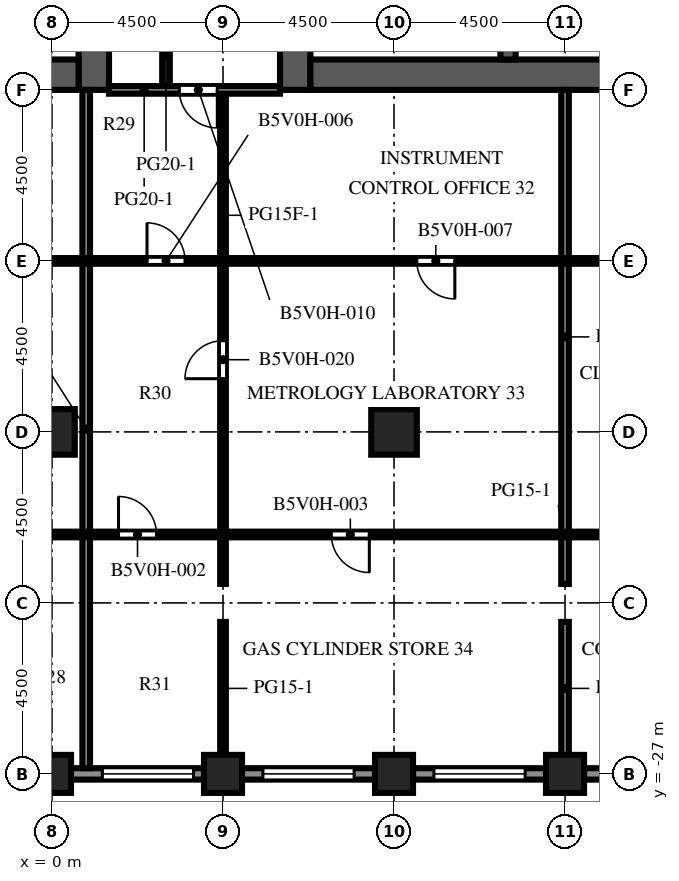
"""IFC4 building model, lengths in metres.
Left out: names, types, materials, properties, quantities, classifications, styles, units other than length and angle.
Written with IfcOpenShell. Run it as: python <this file> out.ifc"""

import sys

from ifc_helpers import new_model, si_unit, direction, frame, frame_2d, origin, origin_2d, place, context, subcontext, project, spatial, rectangle, extrude, element, fill, save


model = new_model("IFC4")
c1 = context("Model", 3, precision=1e-05, world=origin(), true_north=direction((0.0, 1.0)))
c2 = subcontext(c1, "Body", "Model", "MODEL_VIEW")
j1 = project(units=[si_unit("LENGTHUNIT", "METRE"), si_unit("PLANEANGLEUNIT", "RADIAN")], contexts=[c1])
p1 = place(None, origin())
s1 = spatial("IfcSite", under=j1, at=p1, CompositionType="ELEMENT")
p2 = place(p1, origin())
s2 = spatial("IfcBuilding", under=s1, at=p2, CompositionType="ELEMENT")
p3 = place(p2, frame((0.0, 0.0, 156.8)))
s3 = spatial("IfcBuildingStorey", under=s2, at=p3, CompositionType="ELEMENT", Elevation=156.8)
for number, where, z_axis, x_axis in (
    (1, (0.0, -27.0, -0.45), (0.0, 0.0, 1.0), (1.0, 0.0, 0.0)),
    (2, (4.5, -27.0, -0.45), (0.0, 0.0, 1.0), (1.0, 0.0, 0.0)),
    (3, (9.0, -27.0, -0.45), (0.0, 0.0, 1.0), (1.0, 0.0, 0.0)),
    (4, (13.5, -27.0, -0.45), (0.0, 0.0, 1.0), (1.0, 0.0, 0.0)),
):
    element("IfcColumn", number, at=place(p3, frame(where, z_axis=z_axis, x_axis=x_axis)), inside=s3, PredefinedType="COLUMN", context=c2, shape_type="SweptSolid", body=[
        extrude(rectangle(XDim=1.0, YDim=1.0, at=origin_2d()), origin(), (0.0, 0.0, 1.0), 4.55),
    ])
for number, where, z_axis, x_axis in (
    (5, (0.0, -18.0, -0.45), (0.0, 0.0, 1.0), (1.0, 0.0, 0.0)),
    (6, (9.0, -18.0, -0.45), (0.0, 0.0, 1.0), (1.0, 0.0, 0.0)),
):
    element("IfcColumn", number, at=place(p3, frame(where, z_axis=z_axis, x_axis=x_axis)), inside=s3, PredefinedType="COLUMN", context=c2, shape_type="SweptSolid", body=[
        extrude(rectangle(XDim=1.2, YDim=1.2, at=origin_2d()), origin(), (0.0, 0.0, 1.0), 4.55),
    ])
p4 = place(p3, frame((1.1, -9.0, 0.0), z_axis=(0.0, 0.0, 1.0), x_axis=(0.0, 1.0, 0.0)))
e7 = element("IfcWall", 7, at=p4, inside=s3, PredefinedType="SHEAR", context=c2, shape_type="SweptSolid", body=[
    extrude(rectangle(XDim=27.5, YDim=0.8, at=frame_2d((13.75, 0.0))), origin(), (0.0, 0.0, 1.0), 4.1),
])
p5 = place(p4, frame((12.55, 0.0, 0.0)))
e8 = element("IfcOpeningElement", 8, at=p5, cuts=e7, PredefinedType="OPENING", context=c2, shape_type="SweptSolid", body=[
    extrude(rectangle(XDim=2.4, YDim=2.4, at=frame_2d((1.2, 1.2))), frame((0.0, 0.41, 0.0), z_axis=(0.0, -1.0, 0.0), x_axis=(1.0, 0.0, 0.0)), (0.0, 0.0, 1.0), 0.82),
])
p6 = place(p4, frame((5.45, 0.0, 0.0)))
e9 = element("IfcOpeningElement", 9, at=p6, cuts=e7, PredefinedType="OPENING", context=c2, shape_type="SweptSolid", body=[
    extrude(rectangle(XDim=1.2, YDim=2.1, at=frame_2d((0.6, 1.05))), frame((0.0, 0.41, 0.0), z_axis=(0.0, -1.0, 0.0), x_axis=(1.0, 0.0, 0.0)), (0.0, 0.0, 1.0), 0.82),
])
p7 = place(p4, frame((19.45, 0.0, 0.0)))
e10 = element("IfcOpeningElement", 10, at=p7, cuts=e7, PredefinedType="OPENING", context=c2, shape_type="SweptSolid", body=[
    extrude(rectangle(XDim=1.0, YDim=2.1, at=frame_2d((0.5, 1.05))), frame((0.0, 0.41, 0.0), z_axis=(0.0, -1.0, 0.0), x_axis=(1.0, 0.0, 0.0)), (0.0, 0.0, 1.0), 0.82),
])
p8 = place(p4, frame((21.137, 0.0, 0.0)))
e11 = element("IfcOpeningElement", 11, at=p8, cuts=e7, PredefinedType="OPENING", context=c2, shape_type="SweptSolid", body=[
    extrude(rectangle(XDim=1.0, YDim=2.1, at=frame_2d((0.5, 1.05))), frame((0.0, 0.41, 0.0), z_axis=(0.0, -1.0, 0.0), x_axis=(1.0, 0.0, 0.0)), (0.0, 0.0, 1.0), 0.82),
])
p9 = place(p4, frame((23.2, 0.0, 0.0)))
e12 = element("IfcOpeningElement", 12, at=p9, cuts=e7, PredefinedType="OPENING", context=c2, shape_type="SweptSolid", body=[
    extrude(rectangle(XDim=1.0, YDim=2.1, at=frame_2d((0.5, 1.05))), frame((0.0, 0.41, 0.0), z_axis=(0.0, -1.0, 0.0), x_axis=(1.0, 0.0, 0.0)), (0.0, 0.0, 1.0), 0.82),
])
p10 = place(p4, frame((25.262, 0.0, 0.0)))
e13 = element("IfcOpeningElement", 13, at=p10, cuts=e7, PredefinedType="OPENING", context=c2, shape_type="SweptSolid", body=[
    extrude(rectangle(XDim=1.0, YDim=2.1, at=frame_2d((0.5, 1.05))), frame((0.0, 0.41, 0.0), z_axis=(0.0, -1.0, 0.0), x_axis=(1.0, 0.0, 0.0)), (0.0, 0.0, 1.0), 0.82),
])
p11 = place(p3, frame((-9.7, -8.6, 0.0), z_axis=(0.0, 0.0, 1.0), x_axis=(1.0, 0.0, 0.0)))
e14 = element("IfcWall", 14, at=p11, inside=s3, PredefinedType="SHEAR", context=c2, shape_type="SweptSolid", body=[
    extrude(rectangle(XDim=10.4, YDim=0.8, at=frame_2d((5.2, 0.0))), origin(), (0.0, 0.0, 1.0), 4.1),
])
p12 = place(p3, frame((6.4, -9.0, 0.0), z_axis=(0.0, 0.0, 1.0), x_axis=(0.0, 1.0, 0.0)))
e15 = element("IfcWall", 15, at=p12, inside=s3, PredefinedType="SHEAR", context=c2, shape_type="SweptSolid", body=[
    extrude(rectangle(XDim=27.5, YDim=0.8, at=frame_2d((13.75, 0.0))), origin(), (0.0, 0.0, 1.0), 4.1),
])
p13 = place(p12, frame((12.55, 0.0, 0.0)))
e16 = element("IfcOpeningElement", 16, at=p13, cuts=e15, PredefinedType="OPENING", context=c2, shape_type="SweptSolid", body=[
    extrude(rectangle(XDim=2.4, YDim=2.4, at=frame_2d((1.2, 1.2))), frame((0.0, 0.41, 0.0), z_axis=(0.0, -1.0, 0.0), x_axis=(1.0, 0.0, 0.0)), (0.0, 0.0, 1.0), 0.82),
])
p14 = place(p12, frame((5.45, 0.0, 0.0)))
e17 = element("IfcOpeningElement", 17, at=p14, cuts=e15, PredefinedType="OPENING", context=c2, shape_type="SweptSolid", body=[
    extrude(rectangle(XDim=1.2, YDim=2.1, at=frame_2d((0.6, 1.05))), frame((0.0, 0.41, 0.0), z_axis=(0.0, -1.0, 0.0), x_axis=(1.0, 0.0, 0.0)), (0.0, 0.0, 1.0), 0.82),
])
p15 = place(p12, frame((19.45, 0.0, 0.0)))
e18 = element("IfcOpeningElement", 18, at=p15, cuts=e15, PredefinedType="OPENING", context=c2, shape_type="SweptSolid", body=[
    extrude(rectangle(XDim=1.0, YDim=2.1, at=frame_2d((0.5, 1.05))), frame((0.0, 0.41, 0.0), z_axis=(0.0, -1.0, 0.0), x_axis=(1.0, 0.0, 0.0)), (0.0, 0.0, 1.0), 0.82),
])
p16 = place(p12, frame((21.137, 0.0, 0.0)))
e19 = element("IfcOpeningElement", 19, at=p16, cuts=e15, PredefinedType="OPENING", context=c2, shape_type="SweptSolid", body=[
    extrude(rectangle(XDim=1.0, YDim=2.1, at=frame_2d((0.5, 1.05))), frame((0.0, 0.41, 0.0), z_axis=(0.0, -1.0, 0.0), x_axis=(1.0, 0.0, 0.0)), (0.0, 0.0, 1.0), 0.82),
])
p17 = place(p12, frame((23.2, 0.0, 0.0)))
e20 = element("IfcOpeningElement", 20, at=p17, cuts=e15, PredefinedType="OPENING", context=c2, shape_type="SweptSolid", body=[
    extrude(rectangle(XDim=1.0, YDim=2.1, at=frame_2d((0.5, 1.05))), frame((0.0, 0.41, 0.0), z_axis=(0.0, -1.0, 0.0), x_axis=(1.0, 0.0, 0.0)), (0.0, 0.0, 1.0), 0.82),
])
p18 = place(p12, frame((25.262, 0.0, 0.0)))
e21 = element("IfcOpeningElement", 21, at=p18, cuts=e15, PredefinedType="OPENING", context=c2, shape_type="SweptSolid", body=[
    extrude(rectangle(XDim=1.0, YDim=2.1, at=frame_2d((0.5, 1.05))), frame((0.0, 0.41, 0.0), z_axis=(0.0, -1.0, 0.0), x_axis=(1.0, 0.0, 0.0)), (0.0, 0.0, 1.0), 0.82),
])
p19 = place(p3, frame((6.8, -8.6, 0.0), z_axis=(0.0, 0.0, 1.0), x_axis=(1.0, 0.0, 0.0)))
e22 = element("IfcWall", 22, at=p19, inside=s3, PredefinedType="SHEAR", context=c2, shape_type="SweptSolid", body=[
    extrude(rectangle(XDim=10.4, YDim=0.8, at=frame_2d((5.2, 0.0))), origin(), (0.0, 0.0, 1.0), 4.1),
])
p20 = place(p3, frame((12.0, -8.2, 0.0), z_axis=(0.0, 0.0, 1.0), x_axis=(0.0, 1.0, 0.0)))
e23 = element("IfcWall", 23, at=p20, inside=s3, PredefinedType="SHEAR", context=c2, shape_type="SweptSolid", body=[
    extrude(rectangle(XDim=7.5, YDim=0.4, at=frame_2d((3.75, 0.0))), origin(), (0.0, 0.0, 1.0), 4.1),
])
p21 = place(p3, frame((4.0, -27.0, 0.0), z_axis=(0.0, 0.0, 1.0), x_axis=(-1.0, 0.0, 0.0)))
e24 = element("IfcWall", 24, at=p21, inside=s3, PredefinedType="SOLIDWALL", context=c2, shape_type="SweptSolid", body=[
    extrude(rectangle(XDim=3.5, YDim=0.3, at=frame_2d((1.75, 0.0))), origin(), (0.0, 0.0, 1.0), 2.85),
])
p22 = place(p21, frame((0.275, 0.0, 0.8)))
e25 = element("IfcOpeningElement", 25, at=p22, cuts=e24, PredefinedType="OPENING", context=c2, shape_type="SweptSolid", body=[
    extrude(rectangle(XDim=2.4, YDim=1.7, at=frame_2d((1.2, 0.85))), frame((0.0, 0.16, 0.0), z_axis=(0.0, -1.0, 0.0), x_axis=(1.0, 0.0, 0.0)), (0.0, 0.0, 1.0), 0.32),
])
p23 = place(p3, frame((8.5, -27.0, 0.0), z_axis=(0.0, 0.0, 1.0), x_axis=(-1.0, 0.0, 0.0)))
e26 = element("IfcWall", 26, at=p23, inside=s3, PredefinedType="SOLIDWALL", context=c2, shape_type="SweptSolid", body=[
    extrude(rectangle(XDim=3.5, YDim=0.3, at=frame_2d((1.75, 0.0))), origin(), (0.0, 0.0, 1.0), 2.85),
])
p24 = place(p23, frame((0.55, 0.0, 0.8)))
e27 = element("IfcOpeningElement", 27, at=p24, cuts=e26, PredefinedType="OPENING", context=c2, shape_type="SweptSolid", body=[
    extrude(rectangle(XDim=2.4, YDim=1.7, at=frame_2d((1.2, 0.85))), frame((0.0, 0.16, 0.0), z_axis=(0.0, -1.0, 0.0), x_axis=(1.0, 0.0, 0.0)), (0.0, 0.0, 1.0), 0.32),
])
p25 = place(p3, frame((13.0, -27.0, 0.0), z_axis=(0.0, 0.0, 1.0), x_axis=(-1.0, 0.0, 0.0)))
e28 = element("IfcWall", 28, at=p25, inside=s3, PredefinedType="SOLIDWALL", context=c2, shape_type="SweptSolid", body=[
    extrude(rectangle(XDim=3.5, YDim=0.3, at=frame_2d((1.75, 0.0))), origin(), (0.0, 0.0, 1.0), 2.85),
])
p26 = place(p25, frame((0.55, 0.0, 0.8)))
e29 = element("IfcOpeningElement", 29, at=p26, cuts=e28, PredefinedType="OPENING", context=c2, shape_type="SweptSolid", body=[
    extrude(rectangle(XDim=2.4, YDim=1.7, at=frame_2d((1.2, 0.85))), frame((0.0, 0.16, 0.0), z_axis=(0.0, -1.0, 0.0), x_axis=(1.0, 0.0, 0.0)), (0.0, 0.0, 1.0), 0.32),
])
p27 = place(p3, frame((17.5, -27.0, 0.0), z_axis=(0.0, 0.0, 1.0), x_axis=(-1.0, 0.0, 0.0)))
e30 = element("IfcWall", 30, at=p27, inside=s3, PredefinedType="SOLIDWALL", context=c2, shape_type="SweptSolid", body=[
    extrude(rectangle(XDim=3.5, YDim=0.3, at=frame_2d((1.75, 0.0))), origin(), (0.0, 0.0, 1.0), 2.85),
])
p28 = place(p27, frame((1.25, 0.0, 0.0)))
e31 = element("IfcOpeningElement", 31, at=p28, cuts=e30, PredefinedType="OPENING", context=c2, shape_type="SweptSolid", body=[
    extrude(rectangle(XDim=1.0, YDim=2.2, at=frame_2d((0.5, 1.1))), frame((0.0, 0.16, 0.0), z_axis=(0.0, -1.0, 0.0), x_axis=(1.0, 0.0, 0.0)), (0.0, 0.0, 1.0), 0.32),
])
p29 = place(p3, frame((0.9, -26.85, 0.0), z_axis=(0.0, 0.0, 1.0), x_axis=(0.0, 1.0, 0.0)))
e32 = element("IfcWall", 32, at=p29, inside=s3, PredefinedType="PARTITIONING", context=c2, shape_type="SweptSolid", body=[
    extrude(rectangle(XDim=17.85, YDim=0.2, at=frame_2d((8.925, 0.0))), origin(), (0.0, 0.0, 1.0), 3.65),
])
p30 = place(p3, frame((3.0, -9.0, 0.0), z_axis=(0.0, 0.0, 1.0), x_axis=(0.0, 1.0, 0.0)))
e33 = element("IfcWall", 33, at=p30, inside=s3, PredefinedType="PARTITIONING", context=c2, shape_type="SweptSolid", body=[
    extrude(rectangle(XDim=4.5, YDim=0.2, at=frame_2d((2.25, 0.0))), origin(), (0.0, 0.0, 1.0), 3.65),
])
p31 = place(p30, frame((1.85, 0.0, 0.0)))
e34 = element("IfcOpeningElement", 34, at=p31, cuts=e33, PredefinedType="OPENING", context=c2, shape_type="SweptSolid", body=[
    extrude(rectangle(XDim=1.0, YDim=2.1, at=frame_2d((0.5, 1.05))), frame((0.0, 0.11, 0.0), z_axis=(0.0, -1.0, 0.0), x_axis=(1.0, 0.0, 0.0)), (0.0, 0.0, 1.0), 0.22),
])
p32 = place(p3, frame((4.5, -26.5, 0.0), z_axis=(0.0, 0.0, 1.0), x_axis=(0.0, 1.0, 0.0)))
e35 = element("IfcWall", 35, at=p32, inside=s3, PredefinedType="PARTITIONING", context=c2, shape_type="SweptSolid", body=[
    extrude(rectangle(XDim=3.5, YDim=0.15, at=frame_2d((1.75, 0.0))), origin(), (0.0, 0.0, 1.0), 3.65),
])
p33 = place(p3, frame((4.5, -9.0, 0.0), z_axis=(0.0, 0.0, 1.0), x_axis=(0.0, -1.0, 0.0)))
e36 = element("IfcWall", 36, at=p33, inside=s3, PredefinedType="PARTITIONING", context=c2, shape_type="SweptSolid", body=[
    extrude(rectangle(XDim=13.0, YDim=0.15, at=frame_2d((6.5, 0.0))), origin(), (0.0, 0.0, 1.0), 3.65),
])
p34 = place(p33, frame((6.6, 0.0, 0.0)))
e37 = element("IfcOpeningElement", 37, at=p34, cuts=e36, PredefinedType="OPENING", context=c2, shape_type="SweptSolid", body=[
    extrude(rectangle(XDim=1.0, YDim=2.1, at=frame_2d((0.5, 1.05))), frame((0.0, 0.085, 0.0), z_axis=(0.0, -1.0, 0.0), x_axis=(1.0, 0.0, 0.0)), (0.0, 0.0, 1.0), 0.17),
])
p35 = place(p3, frame((13.5, -26.5, 0.0), z_axis=(0.0, 0.0, 1.0), x_axis=(0.0, 1.0, 0.0)))
e38 = element("IfcWall", 38, at=p35, inside=s3, PredefinedType="PARTITIONING", context=c2, shape_type="SweptSolid", body=[
    extrude(rectangle(XDim=3.5, YDim=0.2, at=frame_2d((1.75, 0.0))), origin(), (0.0, 0.0, 1.0), 3.65),
])
p36 = place(p3, frame((13.5, -22.0, 0.0), z_axis=(0.0, 0.0, 1.0), x_axis=(0.0, 1.0, 0.0)))
e39 = element("IfcWall", 39, at=p36, inside=s3, PredefinedType="PARTITIONING", context=c2, shape_type="SweptSolid", body=[
    extrude(rectangle(XDim=13.0, YDim=0.2, at=frame_2d((6.5, 0.0))), origin(), (0.0, 0.0, 1.0), 3.65),
])
p37 = place(p3, frame((21.0, -20.7, 0.0), z_axis=(0.0, 0.0, 1.0), x_axis=(-1.0, 0.0, 0.0)))
e40 = element("IfcWall", 40, at=p37, inside=s3, PredefinedType="PARTITIONING", context=c2, shape_type="SweptSolid", body=[
    extrude(rectangle(XDim=34.5, YDim=0.15, at=frame_2d((17.25, 0.0))), origin(), (0.0, 0.0, 1.0), 3.65),
])
p38 = place(p37, frame((26.9, 0.0, 0.0)))
e41 = element("IfcOpeningElement", 41, at=p38, cuts=e40, PredefinedType="OPENING", context=c2, shape_type="SweptSolid", body=[
    extrude(rectangle(XDim=1.0, YDim=2.1, at=frame_2d((0.5, 1.05))), frame((0.0, 0.085, 0.0), z_axis=(0.0, -1.0, 0.0), x_axis=(1.0, 0.0, 0.0)), (0.0, 0.0, 1.0), 0.17),
])
p39 = place(p37, frame((18.25, 0.0, 0.0)))
e42 = element("IfcOpeningElement", 42, at=p39, cuts=e40, PredefinedType="OPENING", context=c2, shape_type="SweptSolid", body=[
    extrude(rectangle(XDim=1.0, YDim=2.1, at=frame_2d((0.5, 1.05))), frame((0.0, 0.085, 0.0), z_axis=(0.0, -1.0, 0.0), x_axis=(1.0, 0.0, 0.0)), (0.0, 0.0, 1.0), 0.17),
])
p40 = place(p37, frame((12.65, 0.0, 0.0)))
e43 = element("IfcOpeningElement", 43, at=p40, cuts=e40, PredefinedType="OPENING", context=c2, shape_type="SweptSolid", body=[
    extrude(rectangle(XDim=1.0, YDim=2.1, at=frame_2d((0.5, 1.05))), frame((0.0, 0.085, 0.0), z_axis=(0.0, -1.0, 0.0), x_axis=(1.0, 0.0, 0.0)), (0.0, 0.0, 1.0), 0.17),
])
p41 = place(p37, frame((1.4, 0.0, 0.0)))
e44 = element("IfcOpeningElement", 44, at=p41, cuts=e40, PredefinedType="OPENING", context=c2, shape_type="SweptSolid", body=[
    extrude(rectangle(XDim=1.0, YDim=2.1, at=frame_2d((0.5, 1.05))), frame((0.0, 0.085, 0.0), z_axis=(0.0, -1.0, 0.0), x_axis=(1.0, 0.0, 0.0)), (0.0, 0.0, 1.0), 0.17),
])
p42 = place(p3, frame((21.0, -13.5, 0.0), z_axis=(0.0, 0.0, 1.0), x_axis=(-1.0, 0.0, 0.0)))
e45 = element("IfcWall", 45, at=p42, inside=s3, PredefinedType="PARTITIONING", context=c2, shape_type="SweptSolid", body=[
    extrude(rectangle(XDim=34.5, YDim=0.15, at=frame_2d((17.25, 0.0))), origin(), (0.0, 0.0, 1.0), 3.65),
])
p43 = place(p42, frame((27.4, 0.0, 0.0)))
e46 = element("IfcOpeningElement", 46, at=p43, cuts=e45, PredefinedType="OPENING", context=c2, shape_type="SweptSolid", body=[
    extrude(rectangle(XDim=1.0, YDim=2.1, at=frame_2d((0.5, 1.05))), frame((0.0, 0.085, 0.0), z_axis=(0.0, -1.0, 0.0), x_axis=(1.0, 0.0, 0.0)), (0.0, 0.0, 1.0), 0.17),
])
p44 = place(p42, frame((17.5, 0.0, 0.0)))
e47 = element("IfcOpeningElement", 47, at=p44, cuts=e45, PredefinedType="OPENING", context=c2, shape_type="SweptSolid", body=[
    extrude(rectangle(XDim=1.0, YDim=2.1, at=frame_2d((0.5, 1.05))), frame((0.0, 0.085, 0.0), z_axis=(0.0, -1.0, 0.0), x_axis=(1.0, 0.0, 0.0)), (0.0, 0.0, 1.0), 0.17),
])
p45 = place(p42, frame((10.4, 0.0, 0.0)))
e48 = element("IfcOpeningElement", 48, at=p45, cuts=e45, PredefinedType="OPENING", context=c2, shape_type="SweptSolid", body=[
    extrude(rectangle(XDim=1.0, YDim=2.1, at=frame_2d((0.5, 1.05))), frame((0.0, 0.085, 0.0), z_axis=(0.0, -1.0, 0.0), x_axis=(1.0, 0.0, 0.0)), (0.0, 0.0, 1.0), 0.17),
])
p46 = place(p42, frame((3.65, 0.0, 0.0)))
e49 = element("IfcOpeningElement", 49, at=p46, cuts=e45, PredefinedType="OPENING", context=c2, shape_type="SweptSolid", body=[
    extrude(rectangle(XDim=1.0, YDim=2.1, at=frame_2d((0.5, 1.05))), frame((0.0, 0.085, 0.0), z_axis=(0.0, -1.0, 0.0), x_axis=(1.0, 0.0, 0.0)), (0.0, 0.0, 1.0), 0.17),
])
p47 = place(p3, frame((6.0, -9.0, 0.0), z_axis=(0.0, 0.0, 1.0), x_axis=(-1.0, 0.0, 0.0)))
e50 = element("IfcWall", 50, at=p47, inside=s3, PredefinedType="PARTITIONING", context=c2, shape_type="SweptSolid", body=[
    extrude(rectangle(XDim=4.5, YDim=0.2, at=frame_2d((2.25, 0.0))), origin(), (0.0, 0.0, 1.0), 3.65),
])
p48 = place(p47, frame((1.65, 0.0, 0.0)))
e51 = element("IfcOpeningElement", 51, at=p48, cuts=e50, PredefinedType="OPENING", context=c2, shape_type="SweptSolid", body=[
    extrude(rectangle(XDim=1.0, YDim=2.1, at=frame_2d((0.5, 1.05))), frame((0.0, 0.11, 0.0), z_axis=(0.0, -1.0, 0.0), x_axis=(1.0, 0.0, 0.0)), (0.0, 0.0, 1.0), 0.22),
])
p49 = place(p22, origin())
e52 = element("IfcWindow", 52, at=p49, inside=s3, PartitioningType="SINGLE_PANEL", PredefinedType="WINDOW", context=c2, shape_type="SweptSolid", body=[
    extrude(rectangle(XDim=2.4, YDim=1.7, at=frame_2d((1.2, 0.85))), frame((0.0, 0.03, 0.0), z_axis=(0.0, -1.0, 0.0), x_axis=(1.0, 0.0, 0.0)), (0.0, 0.0, 1.0), 0.06),
])
fill(e25, e52)
p50 = place(p24, origin())
e53 = element("IfcWindow", 53, at=p50, inside=s3, PartitioningType="SINGLE_PANEL", PredefinedType="WINDOW", context=c2, shape_type="SweptSolid", body=[
    extrude(rectangle(XDim=2.4, YDim=1.7, at=frame_2d((1.2, 0.85))), frame((0.0, 0.03, 0.0), z_axis=(0.0, -1.0, 0.0), x_axis=(1.0, 0.0, 0.0)), (0.0, 0.0, 1.0), 0.06),
])
fill(e27, e53)
p51 = place(p26, origin())
e54 = element("IfcWindow", 54, at=p51, inside=s3, PartitioningType="SINGLE_PANEL", PredefinedType="WINDOW", context=c2, shape_type="SweptSolid", body=[
    extrude(rectangle(XDim=2.4, YDim=1.7, at=frame_2d((1.2, 0.85))), frame((0.0, 0.03, 0.0), z_axis=(0.0, -1.0, 0.0), x_axis=(1.0, 0.0, 0.0)), (0.0, 0.0, 1.0), 0.06),
])
fill(e29, e54)
p52 = place(p39, origin())
e55 = element("IfcDoor", 55, at=p52, inside=s3, OperationType="SINGLE_SWING_RIGHT", PredefinedType="DOOR", context=c2, shape_type="SweptSolid", body=[
    extrude(rectangle(XDim=1.0, YDim=2.1, at=frame_2d((0.5, 1.05))), frame((0.0, 0.025, 0.0), z_axis=(0.0, -1.0, 0.0), x_axis=(1.0, 0.0, 0.0)), (0.0, 0.0, 1.0), 0.05),
])
fill(e42, e55)
p53 = place(p40, origin())
e56 = element("IfcDoor", 56, at=p53, inside=s3, OperationType="SINGLE_SWING_LEFT", PredefinedType="DOOR", context=c2, shape_type="SweptSolid", body=[
    extrude(rectangle(XDim=1.0, YDim=2.1, at=frame_2d((0.5, 1.05))), frame((0.0, 0.025, 0.0), z_axis=(0.0, -1.0, 0.0), x_axis=(1.0, 0.0, 0.0)), (0.0, 0.0, 1.0), 0.05),
])
fill(e43, e56)
p54 = place(p44, origin())
e57 = element("IfcDoor", 57, at=p54, inside=s3, OperationType="SINGLE_SWING_RIGHT", PredefinedType="DOOR", context=c2, shape_type="SweptSolid", body=[
    extrude(rectangle(XDim=1.0, YDim=2.1, at=frame_2d((0.5, 1.05))), frame((0.0, 0.025, 0.0), z_axis=(0.0, -1.0, 0.0), x_axis=(1.0, 0.0, 0.0)), (0.0, 0.0, 1.0), 0.05),
])
fill(e47, e57)
p55 = place(p45, origin())
e58 = element("IfcDoor", 58, at=p55, inside=s3, OperationType="SINGLE_SWING_LEFT", PredefinedType="DOOR", context=c2, shape_type="SweptSolid", body=[
    extrude(rectangle(XDim=1.0, YDim=2.1, at=frame_2d((0.5, 1.05))), frame((0.0, 0.025, 0.0), z_axis=(0.0, -1.0, 0.0), x_axis=(1.0, 0.0, 0.0)), (0.0, 0.0, 1.0), 0.05),
])
fill(e48, e58)
p56 = place(p48, origin())
e59 = element("IfcDoor", 59, at=p56, inside=s3, OperationType="SINGLE_SWING_LEFT", PredefinedType="DOOR", context=c2, shape_type="SweptSolid", body=[
    extrude(rectangle(XDim=1.0, YDim=2.1, at=frame_2d((0.5, 1.05))), frame((0.0, 0.025, 0.0), z_axis=(0.0, -1.0, 0.0), x_axis=(1.0, 0.0, 0.0)), (0.0, 0.0, 1.0), 0.05),
])
fill(e51, e59)
p57 = place(p34, origin())
e60 = element("IfcDoor", 60, at=p57, inside=s3, OperationType="SINGLE_SWING_RIGHT", PredefinedType="DOOR", context=c2, shape_type="SweptSolid", body=[
    extrude(rectangle(XDim=1.0, YDim=2.1, at=frame_2d((0.5, 1.05))), frame((0.0, 0.025, 0.0), z_axis=(0.0, -1.0, 0.0), x_axis=(1.0, 0.0, 0.0)), (0.0, 0.0, 1.0), 0.05),
])
fill(e37, e60)
save(model, sys.argv[1])
